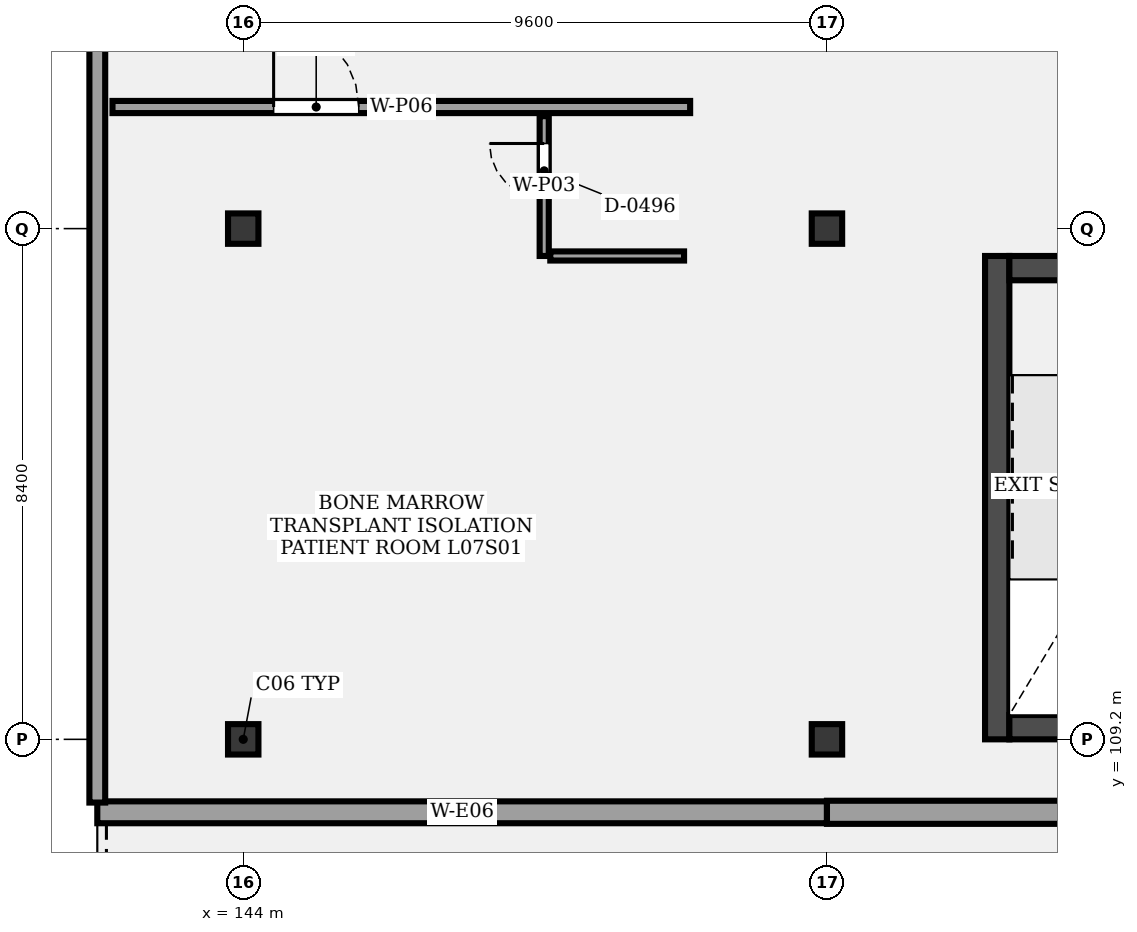
"""IFC4 building model, lengths in metres.
Left out: names, types, materials, properties, quantities, classifications, styles, units other than length and angle.
Written with IfcOpenShell. Run it as: python <this file> out.ifc"""

import sys

from ifc_helpers import new_model, si_unit, direction, frame, frame_2d, origin, origin_2d, place, context, subcontext, project, spatial, rectangle, extrude, element, fill, save


model = new_model("IFC4")
c1 = context("Model", 3, precision=1e-05, world=origin(), true_north=direction((0.0, 1.0)))
c2 = subcontext(c1, "Body", "Model", "MODEL_VIEW")
j1 = project(units=[si_unit("LENGTHUNIT", "METRE"), si_unit("PLANEANGLEUNIT", "RADIAN")], contexts=[c1])
p1 = place(None, origin())
s1 = spatial("IfcSite", under=j1, at=p1, CompositionType="ELEMENT")
p2 = place(p1, origin())
s2 = spatial("IfcBuilding", under=s1, at=p2, CompositionType="ELEMENT")
p3 = place(p2, frame((0.0, 0.0, 30.4)))
s3 = spatial("IfcBuildingStorey", under=s2, at=p3, CompositionType="ELEMENT", Elevation=30.4)
for number, where, z_axis, x_axis in (
    (1, (144.0, 109.2, 0.0), (0.0, 0.0, 1.0), (1.0, 0.0, 0.0)),
    (2, (144.0, 117.6, 0.0), (0.0, 0.0, 1.0), (1.0, 0.0, 0.0)),
    (3, (153.6, 109.2, 0.0), (0.0, 0.0, 1.0), (1.0, 0.0, 0.0)),
    (4, (153.6, 117.6, 0.0), (0.0, 0.0, 1.0), (1.0, 0.0, 0.0)),
):
    element("IfcColumn", number, at=place(p3, frame(where, z_axis=z_axis, x_axis=x_axis)), inside=s3, PredefinedType="COLUMN", context=c2, shape_type="SweptSolid", body=[
        extrude(rectangle(XDim=0.5, YDim=0.5, at=origin_2d()), origin(), (0.0, 0.0, 1.0), 4.2),
    ])
p4 = place(p3, frame((156.4, 117.15, 0.0), z_axis=(0.0, 0.0, 1.0), x_axis=(0.0, -1.0, 0.0)))
e5 = element("IfcWall", 5, at=p4, inside=s3, PredefinedType="SHEAR", context=c2, shape_type="SweptSolid", body=[
    extrude(rectangle(XDim=7.95, YDim=0.4, at=frame_2d((3.975, 0.0))), origin(), (0.0, 0.0, 1.0), 4.2),
])
p5 = place(p3, frame((156.6, 109.4, 0.0), z_axis=(0.0, 0.0, 1.0), x_axis=(1.0, 0.0, 0.0)))
e6 = element("IfcWall", 6, at=p5, inside=s3, PredefinedType="SHEAR", context=c2, shape_type="SweptSolid", body=[
    extrude(rectangle(XDim=3.36, YDim=0.4, at=frame_2d((1.68, 0.0))), origin(), (0.0, 0.0, 1.0), 4.2),
])
p6 = place(p3, frame((159.96, 116.95, 0.0), z_axis=(0.0, 0.0, 1.0), x_axis=(-1.0, 0.0, 0.0)))
e7 = element("IfcWall", 7, at=p6, inside=s3, PredefinedType="SHEAR", context=c2, shape_type="SweptSolid", body=[
    extrude(rectangle(XDim=3.36, YDim=0.4, at=frame_2d((1.68, 0.0))), origin(), (0.0, 0.0, 1.0), 4.2),
])
p7 = place(p6, frame((1.08, 0.0, 0.0)))
e8 = element("IfcOpeningElement", 8, at=p7, cuts=e7, PredefinedType="OPENING", context=c2, shape_type="SweptSolid", body=[
    extrude(rectangle(XDim=1.2, YDim=2.2, at=frame_2d((0.6, 1.1))), frame((0.0, 0.21, 0.0), z_axis=(0.0, -1.0, 0.0), x_axis=(1.0, 0.0, 0.0)), (0.0, 0.0, 1.0), 0.42),
])
p8 = place(p3, frame((153.6, 108.0, 0.0), z_axis=(0.0, 0.0, 1.0), x_axis=(-1.0, 0.0, 0.0)))
e9 = element("IfcWall", 9, at=p8, inside=s3, PredefinedType="SOLIDWALL", context=c2, shape_type="SweptSolid", body=[
    extrude(rectangle(XDim=12.0, YDim=0.36, at=frame_2d((6.0, 0.0))), origin(), (0.0, 0.0, 1.0), 2.58),
])
p9 = place(p3, frame((172.8, 108.0, 0.0), z_axis=(0.0, 0.0, 1.0), x_axis=(-1.0, 0.0, 0.0)))
e10 = element("IfcWall", 10, at=p9, inside=s3, PredefinedType="SOLIDWALL", context=c2, shape_type="SweptSolid", body=[
    extrude(rectangle(XDim=19.2, YDim=0.38, at=frame_2d((9.6, 0.0))), origin(), (0.0, 0.0, 1.0), 2.58),
])
p10 = place(p9, frame((4.0, 0.0, 0.0)))
e11 = element("IfcOpeningElement", 11, at=p10, cuts=e10, PredefinedType="OPENING", context=c2, shape_type="SweptSolid", body=[
    extrude(rectangle(XDim=1.6, YDim=2.3, at=frame_2d((0.8, 1.15))), frame((0.0, 0.2, 0.0), z_axis=(0.0, -1.0, 0.0), x_axis=(1.0, 0.0, 0.0)), (0.0, 0.0, 1.0), 0.4),
])
p11 = place(p3, frame((141.6, 108.16, 0.0), z_axis=(0.0, 0.0, 1.0), x_axis=(0.0, 1.0, 0.0)))
e12 = element("IfcWall", 12, at=p11, inside=s3, PredefinedType="SOLIDWALL", context=c2, shape_type="SweptSolid", body=[
    extrude(rectangle(XDim=26.08, YDim=0.26, at=frame_2d((13.04, 0.0))), origin(), (0.0, 0.0, 1.0), 2.58),
])
p12 = place(p3, frame((141.85, 119.6, 0.0), z_axis=(0.0, 0.0, 1.0), x_axis=(1.0, 0.0, 0.0)))
e13 = element("IfcWall", 13, at=p12, inside=s3, PredefinedType="PARTITIONING", context=c2, shape_type="SweptSolid", body=[
    extrude(rectangle(XDim=9.5, YDim=0.2, at=frame_2d((4.75, 0.0))), origin(), (0.0, 0.0, 1.0), 2.58),
])
p13 = place(p12, frame((2.65, 0.0, 0.0)))
e14 = element("IfcOpeningElement", 14, at=p13, cuts=e13, PredefinedType="OPENING", context=c2, shape_type="SweptSolid", body=[
    extrude(rectangle(XDim=1.4, YDim=2.4, at=frame_2d((0.7, 1.2))), frame((0.0, 0.11, 0.0), z_axis=(0.0, -1.0, 0.0), x_axis=(1.0, 0.0, 0.0)), (0.0, 0.0, 1.0), 0.22),
])
p14 = place(p3, frame((148.95, 117.15, 0.0), z_axis=(0.0, 0.0, 1.0), x_axis=(0.0, 1.0, 0.0)))
e15 = element("IfcWall", 15, at=p14, inside=s3, PredefinedType="PARTITIONING", context=c2, shape_type="SweptSolid", body=[
    extrude(rectangle(XDim=2.3, YDim=0.15, at=frame_2d((1.15, 0.0))), origin(), (0.0, 0.0, 1.0), 2.58),
])
p15 = place(p14, frame((0.95, 0.0, 0.0)))
e16 = element("IfcOpeningElement", 16, at=p15, cuts=e15, PredefinedType="OPENING", context=c2, shape_type="SweptSolid", body=[
    extrude(rectangle(XDim=0.9, YDim=2.1, at=frame_2d((0.45, 1.05))), frame((0.0, 0.085, 0.0), z_axis=(0.0, -1.0, 0.0), x_axis=(1.0, 0.0, 0.0)), (0.0, 0.0, 1.0), 0.17),
])
p16 = place(p3, frame((149.05, 117.15, 0.0), z_axis=(0.0, 0.0, 1.0), x_axis=(1.0, 0.0, 0.0)))
e17 = element("IfcWall", 17, at=p16, inside=s3, PredefinedType="PARTITIONING", context=c2, shape_type="SweptSolid", body=[
    extrude(rectangle(XDim=2.2, YDim=0.15, at=frame_2d((1.1, 0.0))), origin(), (0.0, 0.0, 1.0), 2.58),
])
p17 = place(p13, origin())
e18 = element("IfcDoor", 18, at=p17, inside=s3, OperationType="SINGLE_SWING_LEFT", PredefinedType="DOOR", context=c2, shape_type="SweptSolid", body=[
    extrude(rectangle(XDim=1.4, YDim=2.4, at=frame_2d((0.7, 1.2))), frame((0.0, 0.025, 0.0), z_axis=(0.0, -1.0, 0.0), x_axis=(1.0, 0.0, 0.0)), (0.0, 0.0, 1.0), 0.05),
])
fill(e14, e18)
p18 = place(p15, origin())
e19 = element("IfcDoor", 19, at=p18, inside=s3, OperationType="SINGLE_SWING_RIGHT", PredefinedType="DOOR", context=c2, shape_type="SweptSolid", body=[
    extrude(rectangle(XDim=0.9, YDim=2.1, at=frame_2d((0.45, 1.05))), frame((0.0, 0.025, 0.0), z_axis=(0.0, -1.0, 0.0), x_axis=(1.0, 0.0, 0.0)), (0.0, 0.0, 1.0), 0.05),
])
fill(e16, e19)
save(model, sys.argv[1])
